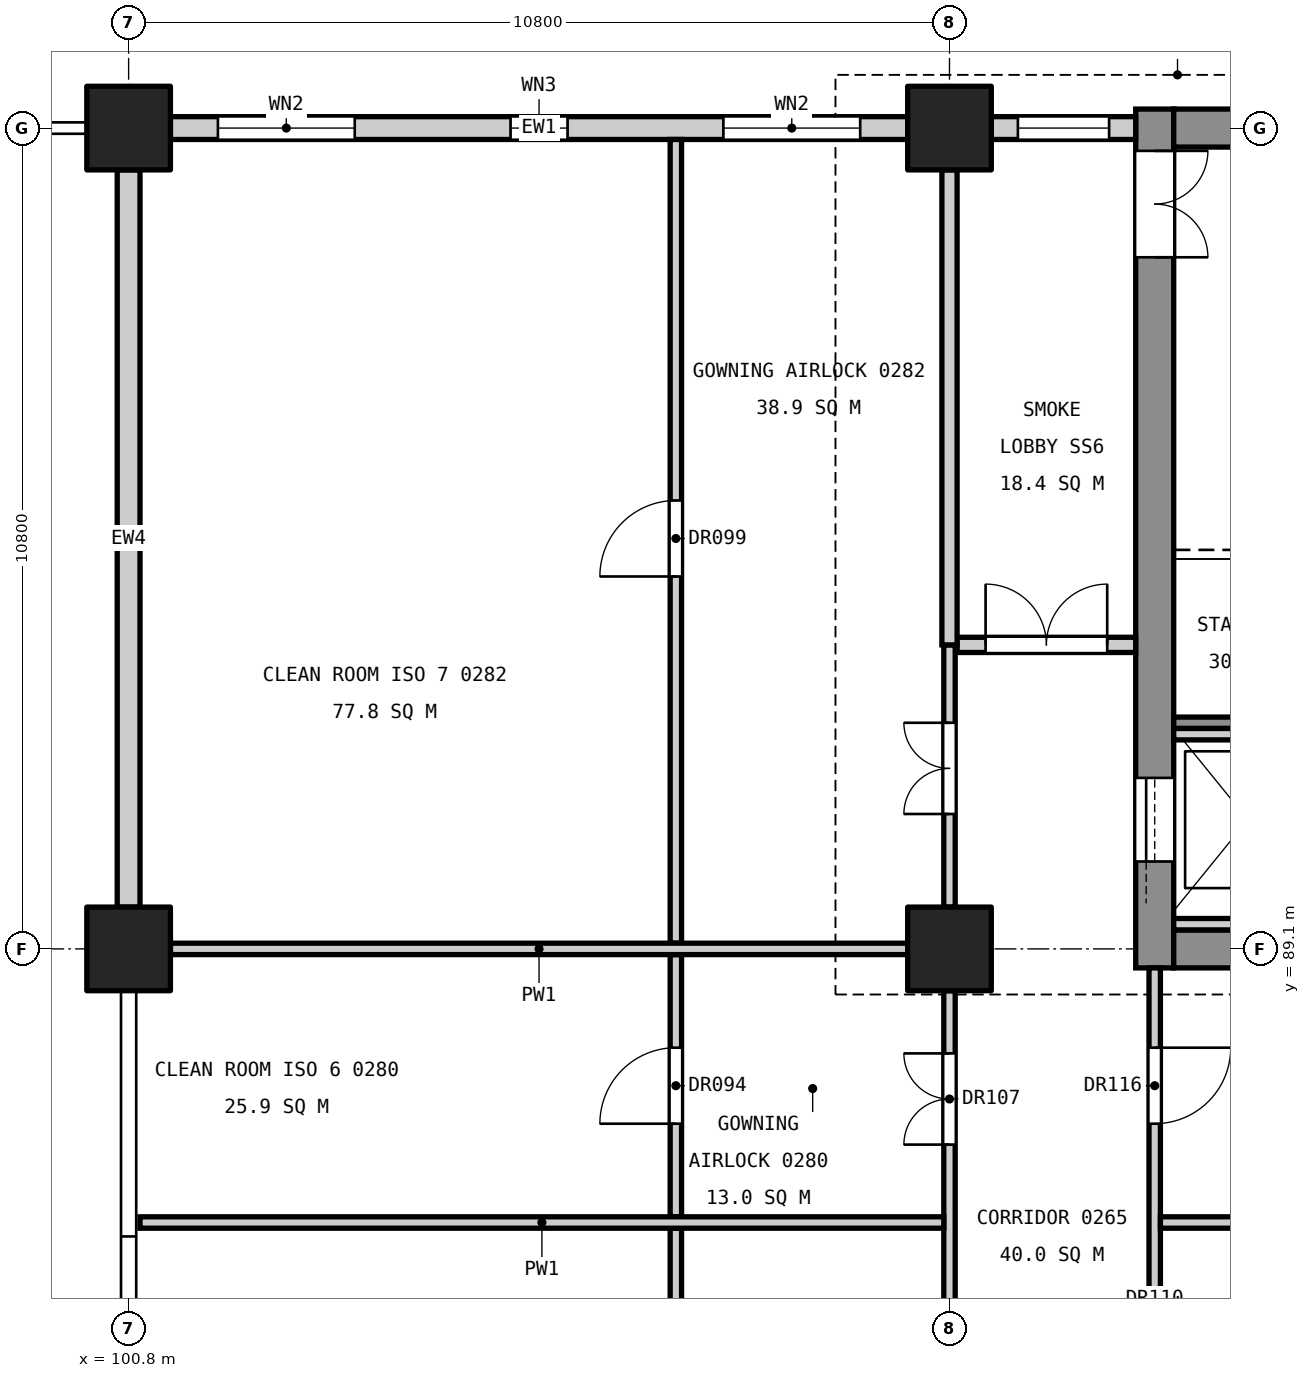
"""IFC4 building model, lengths in metres.
Left out: names, types, materials, properties, quantities, classifications, styles, units other than length and angle.
Written with IfcOpenShell. Run it as: python <this file> out.ifc"""

import sys

from ifc_helpers import new_model, si_unit, direction, frame, frame_2d, origin, origin_2d, place, context, subcontext, project, spatial, rectangle, extrude, element, fill, save


model = new_model("IFC4")
c1 = context("Model", 3, precision=1e-05, world=origin(), true_north=direction((0.0, 1.0)))
c2 = subcontext(c1, "Body", "Model", "MODEL_VIEW")
j1 = project(units=[si_unit("LENGTHUNIT", "METRE"), si_unit("PLANEANGLEUNIT", "RADIAN")], contexts=[c1])
p1 = place(None, origin())
s1 = spatial("IfcSite", under=j1, at=p1, CompositionType="ELEMENT")
p2 = place(p1, origin())
s2 = spatial("IfcBuilding", under=s1, at=p2, CompositionType="ELEMENT")
p3 = place(p2, frame((0.0, 0.0, 11.4)))
s3 = spatial("IfcBuildingStorey", under=s2, at=p3, CompositionType="ELEMENT", Elevation=11.4)
for number, where, z_axis, x_axis in (
    (1, (111.6, 89.1, 0.0), (0.0, 0.0, 1.0), (1.0, 0.0, 0.0)),
    (2, (111.6, 99.9, 0.0), (0.0, 0.0, 1.0), (1.0, 0.0, 0.0)),
    (3, (100.8, 89.1, 0.0), (0.0, 0.0, 1.0), (1.0, 0.0, 0.0)),
    (4, (100.8, 99.9, 0.0), (0.0, 0.0, 1.0), (1.0, 0.0, 0.0)),
):
    element("IfcColumn", number, at=place(p3, frame(where, z_axis=z_axis, x_axis=x_axis)), inside=s3, PredefinedType="COLUMN", context=c2, shape_type="SweptSolid", body=[
        extrude(rectangle(XDim=1.1, YDim=1.1, at=origin_2d()), origin(), (0.0, 0.0, 1.0), 5.4),
    ])
p4 = place(p3, frame((114.3, 88.85, 0.0), z_axis=(0.0, 0.0, 1.0), x_axis=(0.0, 1.0, 0.0)))
e5 = element("IfcWall", 5, at=p4, inside=s3, PredefinedType="SHEAR", context=c2, shape_type="SweptSolid", body=[
    extrude(rectangle(XDim=11.3, YDim=0.5, at=frame_2d((5.65, 0.0))), origin(), (0.0, 0.0, 1.0), 5.1),
])
p5 = place(p4, frame((9.35, 0.0, 0.0)))
e6 = element("IfcOpeningElement", 6, at=p5, cuts=e5, PredefinedType="OPENING", context=c2, shape_type="SweptSolid", body=[
    extrude(rectangle(XDim=1.4, YDim=2.1, at=frame_2d((0.7, 1.05))), frame((0.0, 0.26, 0.0), z_axis=(0.0, -1.0, 0.0), x_axis=(1.0, 0.0, 0.0)), (0.0, 0.0, 1.0), 0.52),
])
p6 = place(p4, frame((1.4, 0.0, 0.0)))
e7 = element("IfcOpeningElement", 7, at=p6, cuts=e5, PredefinedType="OPENING", context=c2, shape_type="SweptSolid", body=[
    extrude(rectangle(XDim=1.1, YDim=2.1, at=frame_2d((0.55, 1.05))), frame((0.0, 0.26, 0.0), z_axis=(0.0, -1.0, 0.0), x_axis=(1.0, 0.0, 0.0)), (0.0, 0.0, 1.0), 0.52),
])
p7 = place(p3, frame((118.55, 89.1, 0.0), z_axis=(0.0, 0.0, 1.0), x_axis=(-1.0, 0.0, 0.0)))
e8 = element("IfcWall", 8, at=p7, inside=s3, PredefinedType="SHEAR", context=c2, shape_type="SweptSolid", body=[
    extrude(rectangle(XDim=4.0, YDim=0.5, at=frame_2d((2.0, 0.0))), origin(), (0.0, 0.0, 1.0), 5.1),
])
p8 = place(p3, frame((118.55, 99.9, 0.0), z_axis=(0.0, 0.0, 1.0), x_axis=(-1.0, 0.0, 0.0)))
e9 = element("IfcWall", 9, at=p8, inside=s3, PredefinedType="SHEAR", context=c2, shape_type="SweptSolid", body=[
    extrude(rectangle(XDim=4.0, YDim=0.5, at=frame_2d((2.0, 0.0))), origin(), (0.0, 0.0, 1.0), 5.1),
])
p9 = place(p8, frame((1.4, 0.0, 3.4)))
e10 = element("IfcOpeningElement", 10, at=p9, cuts=e9, PredefinedType="OPENING", context=c2, shape_type="SweptSolid", body=[
    extrude(rectangle(XDim=1.2, YDim=0.9, at=frame_2d((0.6, 0.45))), frame((0.0, 0.26, 0.0), z_axis=(0.0, -1.0, 0.0), x_axis=(1.0, 0.0, 0.0)), (0.0, 0.0, 1.0), 0.52),
])
p10 = place(p3, frame((118.55, 92.075, 0.0), z_axis=(0.0, 0.0, 1.0), x_axis=(-1.0, 0.0, 0.0)))
e11 = element("IfcWall", 11, at=p10, inside=s3, PredefinedType="SOLIDWALL", context=c2, shape_type="SweptSolid", body=[
    extrude(rectangle(XDim=4.0, YDim=0.15, at=frame_2d((2.0, 0.0))), origin(), (0.0, 0.0, 1.0), 5.1),
])
for number, where, z_axis, x_axis in (
    (12, (116.35, 91.925, 0.0), (0.0, 0.0, 1.0), (-1.0, 0.0, 0.0)),
    (13, (116.35, 89.425, 0.0), (0.0, 0.0, 1.0), (-1.0, 0.0, 0.0)),
):
    element("IfcWall", number, at=place(p3, frame(where, z_axis=z_axis, x_axis=x_axis)), inside=s3, PredefinedType="SOLIDWALL", context=c2, shape_type="SweptSolid", body=[
        extrude(rectangle(XDim=1.8, YDim=0.15, at=frame_2d((0.9, 0.0))), origin(), (0.0, 0.0, 1.0), 5.4),
    ])
p11 = place(p3, frame((114.05, 99.9, 0.0), z_axis=(0.0, 0.0, 1.0), x_axis=(-1.0, 0.0, 0.0)))
e14 = element("IfcWall", 14, at=p11, inside=s3, PredefinedType="STANDARD", context=c2, shape_type="SweptSolid", body=[
    extrude(rectangle(XDim=1.9, YDim=0.3, at=frame_2d((0.95, 0.0))), origin(), (0.0, 0.0, 1.0), 4.3),
])
p12 = place(p11, frame((0.35, 0.0, 0.9)))
e15 = element("IfcOpeningElement", 15, at=p12, cuts=e14, PredefinedType="OPENING", context=c2, shape_type="SweptSolid", body=[
    extrude(rectangle(XDim=1.2, YDim=2.4, at=frame_2d((0.6, 1.2))), frame((0.0, 0.16, 0.0), z_axis=(0.0, -1.0, 0.0), x_axis=(1.0, 0.0, 0.0)), (0.0, 0.0, 1.0), 0.32),
])
p13 = place(p3, frame((111.05, 99.9, 0.0), z_axis=(0.0, 0.0, 1.0), x_axis=(-1.0, 0.0, 0.0)))
e16 = element("IfcWall", 16, at=p13, inside=s3, PredefinedType="STANDARD", context=c2, shape_type="SweptSolid", body=[
    extrude(rectangle(XDim=9.7, YDim=0.3, at=frame_2d((4.85, 0.0))), origin(), (0.0, 0.0, 1.0), 4.3),
])
p14 = place(p13, frame((0.625, 0.0, 0.9)))
e17 = element("IfcOpeningElement", 17, at=p14, cuts=e16, PredefinedType="OPENING", context=c2, shape_type="SweptSolid", body=[
    extrude(rectangle(XDim=1.8, YDim=3.0, at=frame_2d((0.9, 1.5))), frame((0.0, 0.16, 0.0), z_axis=(0.0, -1.0, 0.0), x_axis=(1.0, 0.0, 0.0)), (0.0, 0.0, 1.0), 0.32),
])
p15 = place(p13, frame((4.475, 0.0, 0.8)))
e18 = element("IfcOpeningElement", 18, at=p15, cuts=e16, PredefinedType="OPENING", context=c2, shape_type="SweptSolid", body=[
    extrude(rectangle(XDim=0.75, YDim=1.2, at=frame_2d((0.375, 0.6))), frame((0.0, 0.16, 0.0), z_axis=(0.0, -1.0, 0.0), x_axis=(1.0, 0.0, 0.0)), (0.0, 0.0, 1.0), 0.32),
])
p16 = place(p13, frame((7.275, 0.0, 0.9)))
e19 = element("IfcOpeningElement", 19, at=p16, cuts=e16, PredefinedType="OPENING", context=c2, shape_type="SweptSolid", body=[
    extrude(rectangle(XDim=1.8, YDim=3.0, at=frame_2d((0.9, 1.5))), frame((0.0, 0.16, 0.0), z_axis=(0.0, -1.0, 0.0), x_axis=(1.0, 0.0, 0.0)), (0.0, 0.0, 1.0), 0.32),
])
p17 = place(p3, frame((100.8, 89.65, 0.0), z_axis=(0.0, 0.0, 1.0), x_axis=(0.0, 1.0, 0.0)))
e20 = element("IfcWall", 20, at=p17, inside=s3, PredefinedType="STANDARD", context=c2, shape_type="SweptSolid", body=[
    extrude(rectangle(XDim=9.7, YDim=0.3, at=frame_2d((4.85, 0.0))), origin(), (0.0, 0.0, 1.0), 4.0),
])
p18 = place(p3, frame((114.3, 78.45, 0.0), z_axis=(0.0, 0.0, 1.0), x_axis=(0.0, 1.0, 0.0)))
e21 = element("IfcWall", 21, at=p18, inside=s3, PredefinedType="PARTITIONING", context=c2, shape_type="SweptSolid", body=[
    extrude(rectangle(XDim=10.4, YDim=0.15, at=frame_2d((5.2, 0.0))), origin(), (0.0, 0.0, 1.0), 4.0),
])
p19 = place(p18, frame((4.75, 0.0, 0.0)))
e22 = element("IfcOpeningElement", 22, at=p19, cuts=e21, PredefinedType="OPENING", context=c2, shape_type="SweptSolid", body=[
    extrude(rectangle(XDim=1.0, YDim=2.1, at=frame_2d((0.5, 1.05))), frame((0.0, 0.085, 0.0), z_axis=(0.0, -1.0, 0.0), x_axis=(1.0, 0.0, 0.0)), (0.0, 0.0, 1.0), 0.17),
])
p20 = place(p18, frame((1.15, 0.0, 0.0)))
e23 = element("IfcOpeningElement", 23, at=p20, cuts=e21, PredefinedType="OPENING", context=c2, shape_type="SweptSolid", body=[
    extrude(rectangle(XDim=1.0, YDim=2.1, at=frame_2d((0.5, 1.05))), frame((0.0, 0.085, 0.0), z_axis=(0.0, -1.0, 0.0), x_axis=(1.0, 0.0, 0.0)), (0.0, 0.0, 1.0), 0.17),
])
p21 = place(p18, frame((8.35, 0.0, 0.0)))
e24 = element("IfcOpeningElement", 24, at=p21, cuts=e21, PredefinedType="OPENING", context=c2, shape_type="SweptSolid", body=[
    extrude(rectangle(XDim=1.0, YDim=2.1, at=frame_2d((0.5, 1.05))), frame((0.0, 0.085, 0.0), z_axis=(0.0, -1.0, 0.0), x_axis=(1.0, 0.0, 0.0)), (0.0, 0.0, 1.0), 0.17),
])
p22 = place(p3, frame((118.65, 85.5, 0.0), z_axis=(0.0, 0.0, 1.0), x_axis=(-1.0, 0.0, 0.0)))
e25 = element("IfcWall", 25, at=p22, inside=s3, PredefinedType="PARTITIONING", context=c2, shape_type="SweptSolid", body=[
    extrude(rectangle(XDim=4.275, YDim=0.15, at=frame_2d((2.137, 0.0))), origin(), (0.0, 0.0, 1.0), 4.3),
])
p23 = place(p3, frame((114.05, 93.1, 0.0), z_axis=(0.0, 0.0, 1.0), x_axis=(-1.0, 0.0, 0.0)))
e26 = element("IfcWall", 26, at=p23, inside=s3, PredefinedType="PARTITIONING", context=c2, shape_type="SweptSolid", body=[
    extrude(rectangle(XDim=2.35, YDim=0.2, at=frame_2d((1.175, 0.0))), origin(), (0.0, 0.0, 1.0), 4.0),
])
p24 = place(p23, frame((0.375, 0.0, 0.0)))
e27 = element("IfcOpeningElement", 27, at=p24, cuts=e26, PredefinedType="OPENING", context=c2, shape_type="SweptSolid", body=[
    extrude(rectangle(XDim=1.6, YDim=2.1, at=frame_2d((0.8, 1.05))), frame((0.0, 0.11, 0.0), z_axis=(0.0, -1.0, 0.0), x_axis=(1.0, 0.0, 0.0)), (0.0, 0.0, 1.0), 0.22),
])
p25 = place(p3, frame((111.6, 78.85, 0.0), z_axis=(0.0, 0.0, 1.0), x_axis=(0.0, 1.0, 0.0)))
e28 = element("IfcWall", 28, at=p25, inside=s3, PredefinedType="PARTITIONING", context=c2, shape_type="SweptSolid", body=[
    extrude(rectangle(XDim=9.7, YDim=0.15, at=frame_2d((4.85, 0.0))), origin(), (0.0, 0.0, 1.0), 4.0),
])
p26 = place(p25, frame((2.825, 0.0, 0.0)))
e29 = element("IfcOpeningElement", 29, at=p26, cuts=e28, PredefinedType="OPENING", context=c2, shape_type="SweptSolid", body=[
    extrude(rectangle(XDim=1.2, YDim=2.1, at=frame_2d((0.6, 1.05))), frame((0.0, 0.085, 0.0), z_axis=(0.0, -1.0, 0.0), x_axis=(1.0, 0.0, 0.0)), (0.0, 0.0, 1.0), 0.17),
])
p27 = place(p25, frame((7.675, 0.0, 0.0)))
e30 = element("IfcOpeningElement", 30, at=p27, cuts=e28, PredefinedType="OPENING", context=c2, shape_type="SweptSolid", body=[
    extrude(rectangle(XDim=1.2, YDim=2.1, at=frame_2d((0.6, 1.05))), frame((0.0, 0.085, 0.0), z_axis=(0.0, -1.0, 0.0), x_axis=(1.0, 0.0, 0.0)), (0.0, 0.0, 1.0), 0.17),
])
p28 = place(p3, frame((111.6, 89.65, 0.0), z_axis=(0.0, 0.0, 1.0), x_axis=(0.0, 1.0, 0.0)))
e31 = element("IfcWall", 31, at=p28, inside=s3, PredefinedType="PARTITIONING", context=c2, shape_type="SweptSolid", body=[
    extrude(rectangle(XDim=3.45, YDim=0.15, at=frame_2d((1.725, 0.0))), origin(), (0.0, 0.0, 1.0), 4.0),
])
p29 = place(p28, frame((1.225, 0.0, 0.0)))
e32 = element("IfcOpeningElement", 32, at=p29, cuts=e31, PredefinedType="OPENING", context=c2, shape_type="SweptSolid", body=[
    extrude(rectangle(XDim=1.2, YDim=2.1, at=frame_2d((0.6, 1.05))), frame((0.0, 0.085, 0.0), z_axis=(0.0, -1.0, 0.0), x_axis=(1.0, 0.0, 0.0)), (0.0, 0.0, 1.0), 0.17),
])
p30 = place(p3, frame((111.6, 93.1, 0.0), z_axis=(0.0, 0.0, 1.0), x_axis=(0.0, 1.0, 0.0)))
e33 = element("IfcWall", 33, at=p30, inside=s3, PredefinedType="PARTITIONING", context=c2, shape_type="SweptSolid", body=[
    extrude(rectangle(XDim=6.25, YDim=0.2, at=frame_2d((3.125, 0.0))), origin(), (0.0, 0.0, 1.0), 4.0),
])
p31 = place(p3, frame((108.0, 78.45, 0.0), z_axis=(0.0, 0.0, 1.0), x_axis=(0.0, 1.0, 0.0)))
e34 = element("IfcWall", 34, at=p31, inside=s3, PredefinedType="PARTITIONING", context=c2, shape_type="SweptSolid", body=[
    extrude(rectangle(XDim=6.975, YDim=0.15, at=frame_2d((3.488, 0.0))), origin(), (0.0, 0.0, 1.0), 4.0),
])
p32 = place(p31, frame((2.95, 0.0, 0.0)))
e35 = element("IfcOpeningElement", 35, at=p32, cuts=e34, PredefinedType="OPENING", context=c2, shape_type="SweptSolid", body=[
    extrude(rectangle(XDim=1.0, YDim=2.1, at=frame_2d((0.5, 1.05))), frame((0.0, 0.085, 0.0), z_axis=(0.0, -1.0, 0.0), x_axis=(1.0, 0.0, 0.0)), (0.0, 0.0, 1.0), 0.17),
])
p33 = place(p3, frame((108.0, 85.575, 0.0), z_axis=(0.0, 0.0, 1.0), x_axis=(0.0, 1.0, 0.0)))
e36 = element("IfcWall", 36, at=p33, inside=s3, PredefinedType="PARTITIONING", context=c2, shape_type="SweptSolid", body=[
    extrude(rectangle(XDim=3.45, YDim=0.15, at=frame_2d((1.725, 0.0))), origin(), (0.0, 0.0, 1.0), 4.0),
])
p34 = place(p33, frame((1.225, 0.0, 0.0)))
e37 = element("IfcOpeningElement", 37, at=p34, cuts=e36, PredefinedType="OPENING", context=c2, shape_type="SweptSolid", body=[
    extrude(rectangle(XDim=1.0, YDim=2.1, at=frame_2d((0.5, 1.05))), frame((0.0, 0.085, 0.0), z_axis=(0.0, -1.0, 0.0), x_axis=(1.0, 0.0, 0.0)), (0.0, 0.0, 1.0), 0.17),
])
p35 = place(p3, frame((108.0, 89.175, 0.0), z_axis=(0.0, 0.0, 1.0), x_axis=(0.0, 1.0, 0.0)))
e38 = element("IfcWall", 38, at=p35, inside=s3, PredefinedType="PARTITIONING", context=c2, shape_type="SweptSolid", body=[
    extrude(rectangle(XDim=10.575, YDim=0.15, at=frame_2d((5.288, 0.0))), origin(), (0.0, 0.0, 1.0), 4.0),
])
p36 = place(p35, frame((4.825, 0.0, 0.0)))
e39 = element("IfcOpeningElement", 39, at=p36, cuts=e38, PredefinedType="OPENING", context=c2, shape_type="SweptSolid", body=[
    extrude(rectangle(XDim=1.0, YDim=2.1, at=frame_2d((0.5, 1.05))), frame((0.0, 0.085, 0.0), z_axis=(0.0, -1.0, 0.0), x_axis=(1.0, 0.0, 0.0)), (0.0, 0.0, 1.0), 0.17),
])
p37 = place(p3, frame((111.525, 85.5, 0.0), z_axis=(0.0, 0.0, 1.0), x_axis=(-1.0, 0.0, 0.0)))
e40 = element("IfcWall", 40, at=p37, inside=s3, PredefinedType="PARTITIONING", context=c2, shape_type="SweptSolid", body=[
    extrude(rectangle(XDim=10.575, YDim=0.15, at=frame_2d((5.288, 0.0))), origin(), (0.0, 0.0, 1.0), 4.3),
])
p38 = place(p3, frame((111.05, 89.1, 0.0), z_axis=(0.0, 0.0, 1.0), x_axis=(-1.0, 0.0, 0.0)))
e41 = element("IfcWall", 41, at=p38, inside=s3, PredefinedType="PARTITIONING", context=c2, shape_type="SweptSolid", body=[
    extrude(rectangle(XDim=9.7, YDim=0.15, at=frame_2d((4.85, 0.0))), origin(), (0.0, 0.0, 1.0), 4.3),
])
p39 = place(p5, frame((1.4, 0.0, 0.0), z_axis=(0.0, 0.0, 1.0), x_axis=(-1.0, 0.0, 0.0)))
e42 = element("IfcDoor", 42, at=p39, inside=s3, OperationType="DOUBLE_DOOR_SINGLE_SWING", PredefinedType="DOOR", context=c2, shape_type="SweptSolid", body=[
    extrude(rectangle(XDim=1.4, YDim=2.1, at=frame_2d((0.7, 1.05))), frame((0.0, 0.025, 0.0), z_axis=(0.0, -1.0, 0.0), x_axis=(1.0, 0.0, 0.0)), (0.0, 0.0, 1.0), 0.05),
])
fill(e6, e42)
p40 = place(p6, origin())
e43 = element("IfcDoor", 43, at=p40, inside=s3, OperationType="SLIDING_TO_LEFT", PredefinedType="DOOR", context=c2, shape_type="SweptSolid", body=[
    extrude(rectangle(XDim=1.1, YDim=2.1, at=frame_2d((0.55, 1.05))), frame((0.0, 0.025, 0.0), z_axis=(0.0, -1.0, 0.0), x_axis=(1.0, 0.0, 0.0)), (0.0, 0.0, 1.0), 0.05),
])
fill(e7, e43)
p41 = place(p12, origin())
e44 = element("IfcWindow", 44, at=p41, inside=s3, PartitioningType="SINGLE_PANEL", PredefinedType="WINDOW", context=c2, shape_type="SweptSolid", body=[
    extrude(rectangle(XDim=1.2, YDim=2.4, at=frame_2d((0.6, 1.2))), frame((0.0, 0.03, 0.0), z_axis=(0.0, -1.0, 0.0), x_axis=(1.0, 0.0, 0.0)), (0.0, 0.0, 1.0), 0.06),
])
fill(e15, e44)
p42 = place(p14, origin())
e45 = element("IfcWindow", 45, at=p42, inside=s3, PartitioningType="SINGLE_PANEL", PredefinedType="WINDOW", context=c2, shape_type="SweptSolid", body=[
    extrude(rectangle(XDim=1.8, YDim=3.0, at=frame_2d((0.9, 1.5))), frame((0.0, 0.03, 0.0), z_axis=(0.0, -1.0, 0.0), x_axis=(1.0, 0.0, 0.0)), (0.0, 0.0, 1.0), 0.06),
])
fill(e17, e45)
p43 = place(p15, origin())
e46 = element("IfcWindow", 46, at=p43, inside=s3, PartitioningType="SINGLE_PANEL", PredefinedType="WINDOW", context=c2, shape_type="SweptSolid", body=[
    extrude(rectangle(XDim=0.75, YDim=1.2, at=frame_2d((0.375, 0.6))), frame((0.0, 0.03, 0.0), z_axis=(0.0, -1.0, 0.0), x_axis=(1.0, 0.0, 0.0)), (0.0, 0.0, 1.0), 0.06),
])
fill(e18, e46)
p44 = place(p16, origin())
e47 = element("IfcWindow", 47, at=p44, inside=s3, PartitioningType="SINGLE_PANEL", PredefinedType="WINDOW", context=c2, shape_type="SweptSolid", body=[
    extrude(rectangle(XDim=1.8, YDim=3.0, at=frame_2d((0.9, 1.5))), frame((0.0, 0.03, 0.0), z_axis=(0.0, -1.0, 0.0), x_axis=(1.0, 0.0, 0.0)), (0.0, 0.0, 1.0), 0.06),
])
fill(e19, e47)
p45 = place(p34, origin())
e48 = element("IfcDoor", 48, at=p45, inside=s3, OperationType="SINGLE_SWING_LEFT", PredefinedType="DOOR", context=c2, shape_type="SweptSolid", body=[
    extrude(rectangle(XDim=1.0, YDim=2.1, at=frame_2d((0.5, 1.05))), frame((0.0, 0.025, 0.0), z_axis=(0.0, -1.0, 0.0), x_axis=(1.0, 0.0, 0.0)), (0.0, 0.0, 1.0), 0.05),
])
fill(e37, e48)
p46 = place(p36, origin())
e49 = element("IfcDoor", 49, at=p46, inside=s3, OperationType="SINGLE_SWING_LEFT", PredefinedType="DOOR", context=c2, shape_type="SweptSolid", body=[
    extrude(rectangle(XDim=1.0, YDim=2.1, at=frame_2d((0.5, 1.05))), frame((0.0, 0.025, 0.0), z_axis=(0.0, -1.0, 0.0), x_axis=(1.0, 0.0, 0.0)), (0.0, 0.0, 1.0), 0.05),
])
fill(e39, e49)
p47 = place(p27, origin())
e50 = element("IfcDoor", 50, at=p47, inside=s3, OperationType="DOUBLE_DOOR_SINGLE_SWING", PredefinedType="DOOR", context=c2, shape_type="SweptSolid", body=[
    extrude(rectangle(XDim=1.2, YDim=2.1, at=frame_2d((0.6, 1.05))), frame((0.0, 0.025, 0.0), z_axis=(0.0, -1.0, 0.0), x_axis=(1.0, 0.0, 0.0)), (0.0, 0.0, 1.0), 0.05),
])
fill(e30, e50)
p48 = place(p29, origin())
e51 = element("IfcDoor", 51, at=p48, inside=s3, OperationType="DOUBLE_DOOR_SINGLE_SWING", PredefinedType="DOOR", context=c2, shape_type="SweptSolid", body=[
    extrude(rectangle(XDim=1.2, YDim=2.1, at=frame_2d((0.6, 1.05))), frame((0.0, 0.025, 0.0), z_axis=(0.0, -1.0, 0.0), x_axis=(1.0, 0.0, 0.0)), (0.0, 0.0, 1.0), 0.05),
])
fill(e32, e51)
p49 = place(p21, frame((1.0, 0.0, 0.0), z_axis=(0.0, 0.0, 1.0), x_axis=(-1.0, 0.0, 0.0)))
e52 = element("IfcDoor", 52, at=p49, inside=s3, OperationType="SINGLE_SWING_LEFT", PredefinedType="DOOR", context=c2, shape_type="SweptSolid", body=[
    extrude(rectangle(XDim=1.0, YDim=2.1, at=frame_2d((0.5, 1.05))), frame((0.0, 0.025, 0.0), z_axis=(0.0, -1.0, 0.0), x_axis=(1.0, 0.0, 0.0)), (0.0, 0.0, 1.0), 0.05),
])
fill(e24, e52)
p50 = place(p24, frame((1.6, 0.0, 0.0), z_axis=(0.0, 0.0, 1.0), x_axis=(-1.0, 0.0, 0.0)))
e53 = element("IfcDoor", 53, at=p50, inside=s3, OperationType="DOUBLE_DOOR_SINGLE_SWING", PredefinedType="DOOR", context=c2, shape_type="SweptSolid", body=[
    extrude(rectangle(XDim=1.6, YDim=2.1, at=frame_2d((0.8, 1.05))), frame((0.0, 0.025, 0.0), z_axis=(0.0, -1.0, 0.0), x_axis=(1.0, 0.0, 0.0)), (0.0, 0.0, 1.0), 0.05),
])
fill(e27, e53)
save(model, sys.argv[1])
